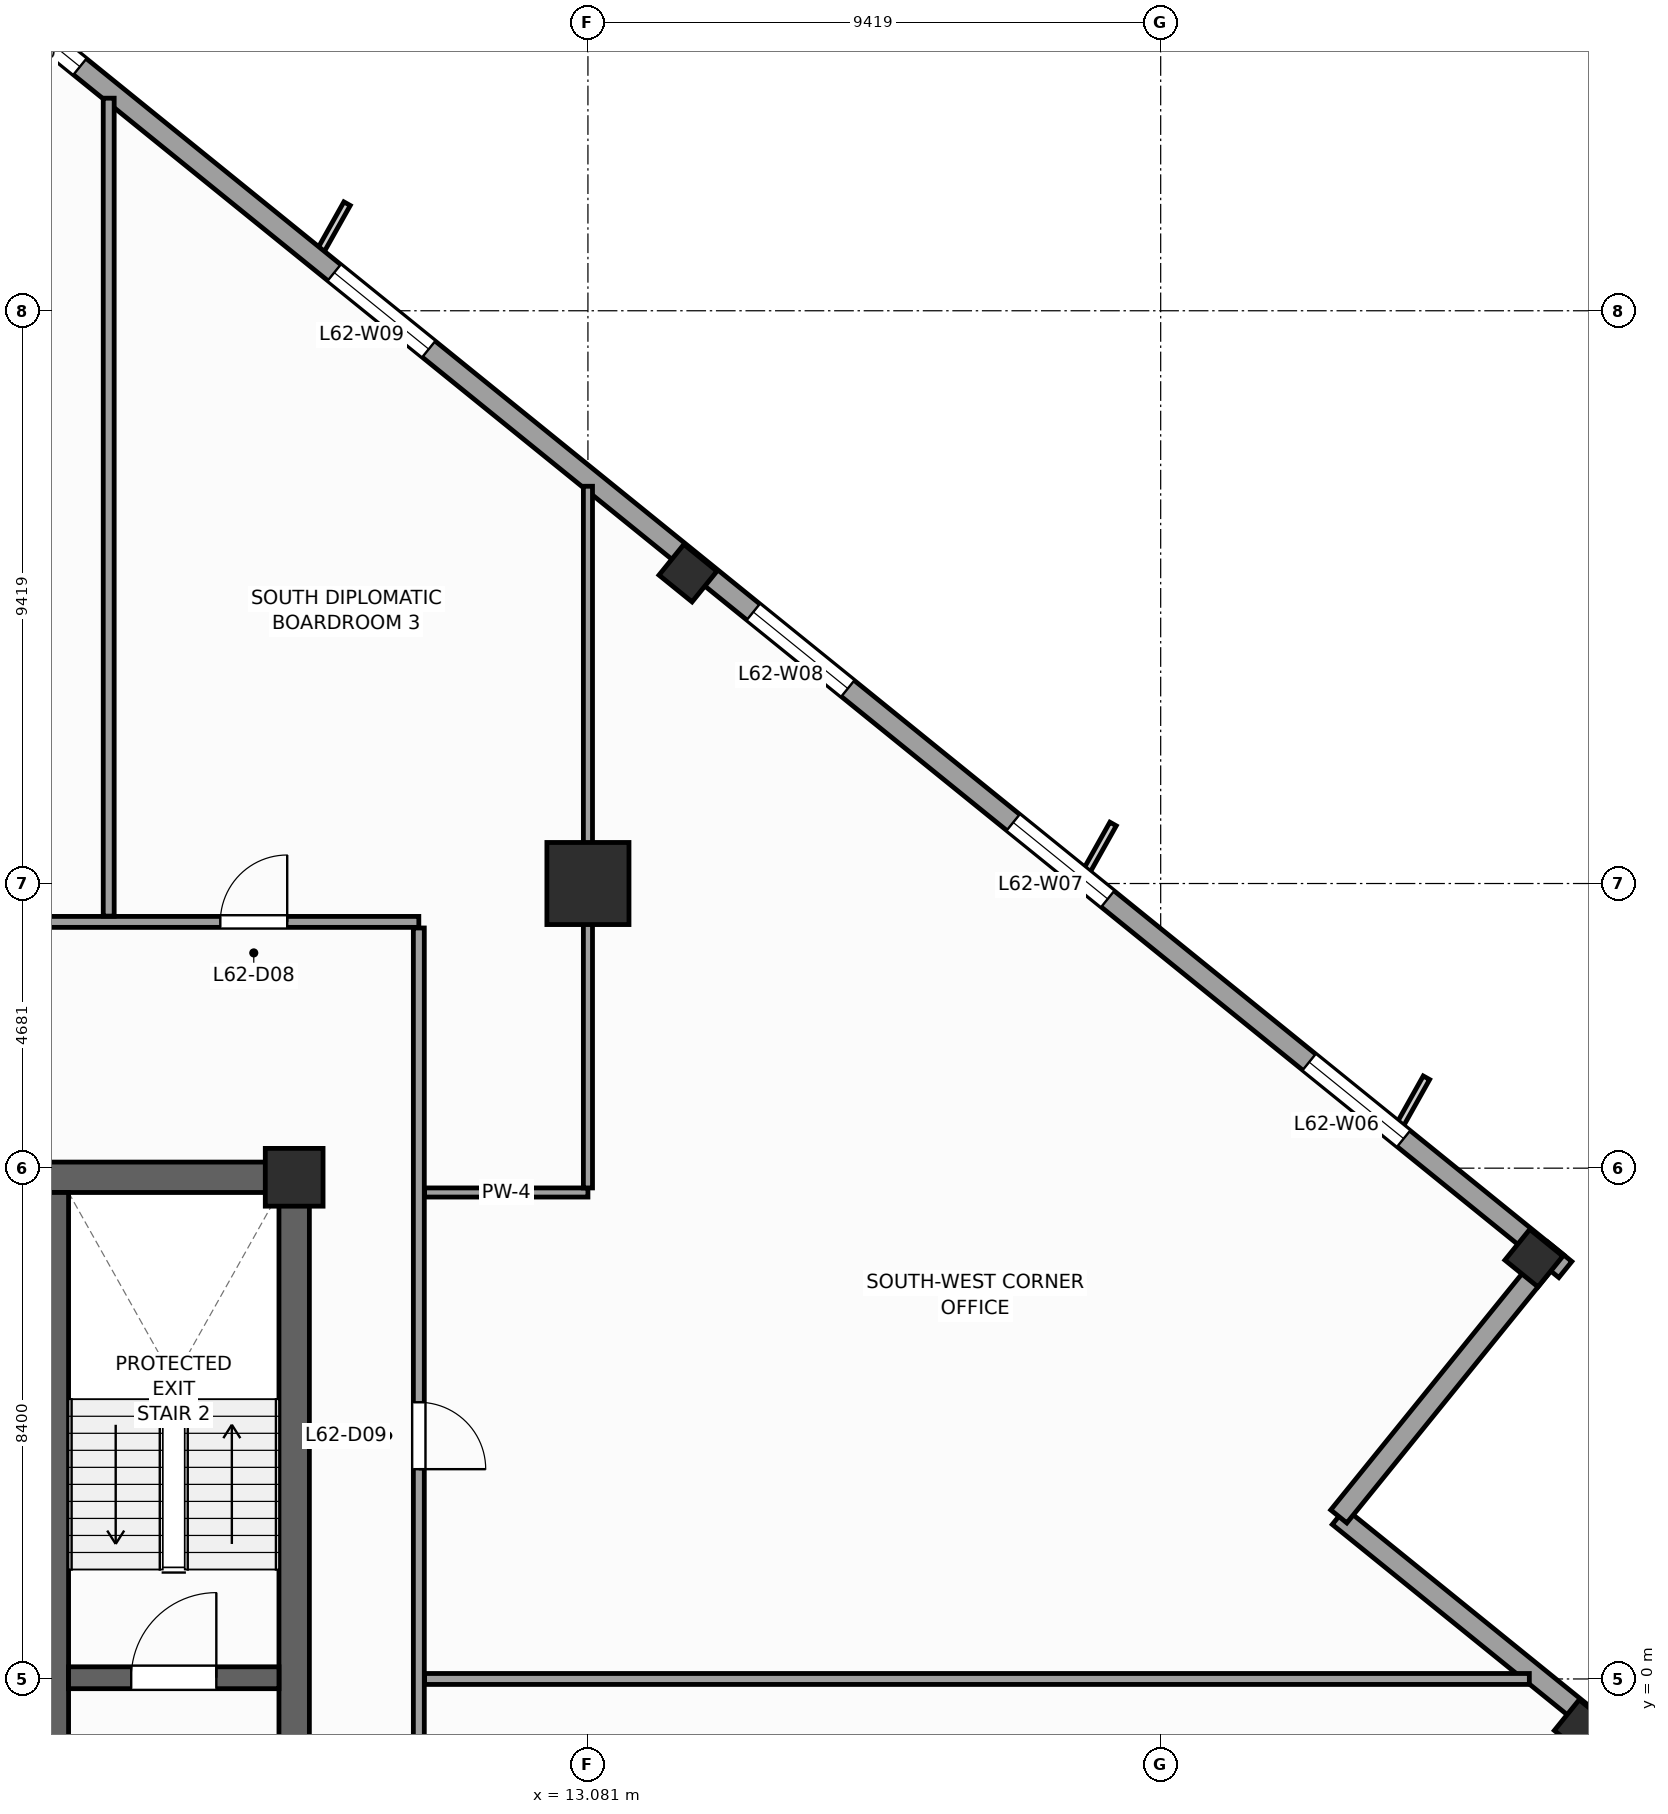
"""IFC4 building model, lengths in metres.
Left out: names, types, materials, properties, quantities, classifications, styles, units other than length and angle.
Written with IfcOpenShell. Run it as: python <this file> out.ifc"""

import sys

from ifc_helpers import new_model, si_unit, direction, frame, frame_2d, origin, origin_2d, place, context, subcontext, project, spatial, rectangle, extrude, source, transform, mapped, element, fill, save


model = new_model("IFC4")
c1 = context("Model", 3, precision=1e-05, world=origin(), true_north=direction((0.0, 1.0)))
c2 = subcontext(c1, "Body", "Model", "MODEL_VIEW")
j1 = project(units=[si_unit("LENGTHUNIT", "METRE"), si_unit("PLANEANGLEUNIT", "RADIAN")], contexts=[c1])
p1 = place(None, origin())
s1 = spatial("IfcSite", under=j1, at=p1, CompositionType="ELEMENT")
p2 = place(p1, origin())
s2 = spatial("IfcBuilding", under=s1, at=p2, CompositionType="ELEMENT")
p3 = place(p2, frame((0.0, 0.0, 256.3)))
s3 = spatial("IfcBuildingStorey", under=s2, at=p3, CompositionType="ELEMENT", Elevation=256.3)
p4 = place(p3, frame((-8.5, 8.25, 0.0), z_axis=(0.0, 0.0, 1.0), x_axis=(1.0, 0.0, 0.0)))
e1 = element("IfcWall", 1, at=p4, inside=s3, PredefinedType="SHEAR", context=c2, shape_type="SweptSolid", body=[
    extrude(rectangle(XDim=17.0, YDim=0.5, at=frame_2d((8.5, 0.0))), origin(), (0.0, 0.0, 1.0), 3.9),
])
p5 = place(p3, frame((8.25, -8.0, 0.0), z_axis=(0.0, 0.0, 1.0), x_axis=(0.0, 1.0, 0.0)))
e2 = element("IfcWall", 2, at=p5, inside=s3, PredefinedType="SHEAR", context=c2, shape_type="SweptSolid", body=[
    extrude(rectangle(XDim=16.0, YDim=0.5, at=frame_2d((8.0, 0.0))), origin(), (0.0, 0.0, 1.0), 3.9),
])
p6 = place(p5, frame((4.69, 0.0, 0.0)))
e3 = element("IfcOpeningElement", 3, at=p6, cuts=e2, PredefinedType="OPENING", context=c2, shape_type="SweptSolid", body=[
    extrude(rectangle(XDim=1.3, YDim=2.2, at=frame_2d((0.65, 1.1))), frame((0.0, 0.26, 0.0), z_axis=(0.0, -1.0, 0.0), x_axis=(1.0, 0.0, 0.0)), (0.0, 0.0, 1.0), 0.52),
])
p7 = place(p3, frame((4.36, -8.0, 0.0), z_axis=(0.0, 0.0, 1.0), x_axis=(0.0, 1.0, 0.0)))
e4 = element("IfcWall", 4, at=p7, inside=s3, PredefinedType="SHEAR", context=c2, shape_type="SweptSolid", body=[
    extrude(rectangle(XDim=16.0, YDim=0.36, at=frame_2d((8.0, 0.0))), origin(), (0.0, 0.0, 1.0), 3.9),
])
p8 = place(p3, frame((4.54, 0.02, 0.0), z_axis=(0.0, 0.0, 1.0), x_axis=(1.0, 0.0, 0.0)))
e5 = element("IfcWall", 5, at=p8, inside=s3, PredefinedType="SHEAR", context=c2, shape_type="SweptSolid", body=[
    extrude(rectangle(XDim=3.46, YDim=0.36, at=frame_2d((1.73, 0.0))), origin(), (0.0, 0.0, 1.0), 3.9),
])
p9 = place(p8, frame((1.03, 0.0, 0.0)))
e6 = element("IfcOpeningElement", 6, at=p9, cuts=e5, PredefinedType="OPENING", context=c2, shape_type="SweptSolid", body=[
    extrude(rectangle(XDim=1.4, YDim=2.2, at=frame_2d((0.7, 1.1))), frame((0.0, 0.19, 0.0), z_axis=(0.0, -1.0, 0.0), x_axis=(1.0, 0.0, 0.0)), (0.0, 0.0, 1.0), 0.38),
])
m1 = source(origin(), c2, "Body", "SweptSolid", [
    extrude(rectangle(XDim=0.95, YDim=0.95, at=origin_2d()), origin(), (0.0, 0.0, 1.0), 3.9),
])
p10 = place(p3, frame((8.25, 8.25, 0.0), z_axis=(0.0, 0.0, 1.0), x_axis=(1.0, 0.0, 0.0)))
e7 = element("IfcColumn", 7, at=p10, inside=s3, PredefinedType="PILASTER", context=c2, shape_type="MappedRepresentation", body=[
    mapped(m1, transform((0.0, 0.0, 0.0), scale=1.0)),
])
m2 = source(origin(), c2, "Body", "SweptSolid", [
    extrude(rectangle(XDim=1.35, YDim=1.35, at=origin_2d()), origin(), (0.0, 0.0, 1.0), 3.9),
])
p11 = place(p3, frame((13.081, 13.081, 0.0), z_axis=(0.0, 0.0, 1.0), x_axis=(1.0, 0.0, 0.0)))
e8 = element("IfcColumn", 8, at=p11, inside=s3, PredefinedType="COLUMN", context=c2, shape_type="MappedRepresentation", body=[
    mapped(m2, transform((0.0, 0.0, 0.0), scale=1.0)),
])
m3 = source(origin(), c2, "Body", "SweptSolid", [
    extrude(rectangle(XDim=0.65, YDim=0.7, at=origin_2d()), origin(), (0.0, 0.0, 1.0), 3.9),
])
for number, where, z_axis, x_axis in (
    (9, (29.45, -0.815, 0.0), (0.0, 0.0, 1.0), (0.629, 0.777, 0.0)),
    (10, (28.637, 6.92, 0.0), (0.0, 0.0, 1.0), (0.629, 0.777, 0.0)),
    (11, (14.726, 18.185, 0.0), (0.0, 0.0, 1.0), (0.629, 0.777, 0.0)),
):
    element("IfcColumn", number, at=place(p3, frame(where, z_axis=z_axis, x_axis=x_axis)), inside=s3, PredefinedType="COLUMN", context=c2, shape_type="MappedRepresentation", body=[
        mapped(m3, transform((0.0, 0.0, 0.0), scale=1.0)),
    ])
p12 = place(p3, frame((6.733, -29.154, 0.0), z_axis=(0.0, 0.0, 1.0), x_axis=(0.629325378072, 0.77714192302, 0.0)))
e12 = element("IfcWall", 12, at=p12, inside=s3, PredefinedType="STANDARD", context=c2, shape_type="SweptSolid", body=[
    extrude(rectangle(XDim=36.84, YDim=0.34, at=frame_2d((18.42, 0.0))), origin(), (0.0, 0.0, 1.0), 2.02),
])
p13 = place(p12, frame((23.495, 0.0, 0.0)))
e13 = element("IfcOpeningElement", 13, at=p13, cuts=e12, PredefinedType="OPENING", context=c2, shape_type="SweptSolid", body=[
    extrude(rectangle(XDim=1.05, YDim=2.02, at=frame_2d((0.525, 1.01))), frame((0.0, 0.18, 0.0), z_axis=(0.0, -1.0, 0.0), x_axis=(1.0, 0.0, 0.0)), (0.0, 0.0, 1.0), 0.36),
])
p14 = place(p12, frame((3.421, 0.0, 0.49)))
e14 = element("IfcOpeningElement", 14, at=p14, cuts=e12, PredefinedType="OPENING", context=c2, shape_type="SweptSolid", body=[
    extrude(rectangle(XDim=2.0, YDim=1.45, at=frame_2d((1.0, 0.725))), frame((0.0, 0.18, 0.0), z_axis=(0.0, -1.0, 0.0), x_axis=(1.0, 0.0, 0.0)), (0.0, 0.0, 1.0), 0.36),
])
p15 = place(p12, frame((11.184, 0.0, 0.49)))
e15 = element("IfcOpeningElement", 15, at=p15, cuts=e12, PredefinedType="OPENING", context=c2, shape_type="SweptSolid", body=[
    extrude(rectangle(XDim=2.0, YDim=1.45, at=frame_2d((1.0, 0.725))), frame((0.0, 0.18, 0.0), z_axis=(0.0, -1.0, 0.0), x_axis=(1.0, 0.0, 0.0)), (0.0, 0.0, 1.0), 0.36),
])
p16 = place(p12, frame((15.183, 0.0, 0.49)))
e16 = element("IfcOpeningElement", 16, at=p16, cuts=e12, PredefinedType="OPENING", context=c2, shape_type="SweptSolid", body=[
    extrude(rectangle(XDim=2.0, YDim=1.45, at=frame_2d((1.0, 0.725))), frame((0.0, 0.18, 0.0), z_axis=(0.0, -1.0, 0.0), x_axis=(1.0, 0.0, 0.0)), (0.0, 0.0, 1.0), 0.36),
])
p17 = place(p12, frame((26.301, 0.0, 0.49)))
e17 = element("IfcOpeningElement", 17, at=p17, cuts=e12, PredefinedType="OPENING", context=c2, shape_type="SweptSolid", body=[
    extrude(rectangle(XDim=2.0, YDim=1.45, at=frame_2d((1.0, 0.725))), frame((0.0, 0.18, 0.0), z_axis=(0.0, -1.0, 0.0), x_axis=(1.0, 0.0, 0.0)), (0.0, 0.0, 1.0), 0.36),
])
p18 = place(p12, frame((30.682, 0.0, 0.49)))
e18 = element("IfcOpeningElement", 18, at=p18, cuts=e12, PredefinedType="OPENING", context=c2, shape_type="SweptSolid", body=[
    extrude(rectangle(XDim=2.0, YDim=1.45, at=frame_2d((1.0, 0.725))), frame((0.0, 0.18, 0.0), z_axis=(0.0, -1.0, 0.0), x_axis=(1.0, 0.0, 0.0)), (0.0, 0.0, 1.0), 0.36),
])
p19 = place(p3, frame((29.703, -0.789, 0.0), z_axis=(0.0, 0.0, 1.0), x_axis=(-0.77714355312, 0.629323365087, 0.0)))
e19 = element("IfcWall", 19, at=p19, inside=s3, PredefinedType="STANDARD", context=c2, shape_type="SweptSolid", body=[
    extrude(rectangle(XDim=5.5, YDim=0.34, at=frame_2d((2.75, 0.0))), origin(), (0.0, 0.0, 1.0), 3.5),
])
p20 = place(p3, frame((25.429, 2.673, 0.0), z_axis=(0.0, 0.0, 1.0), x_axis=(0.629299794138, 0.777162640055, 0.0)))
e20 = element("IfcWall", 20, at=p20, inside=s3, PredefinedType="STANDARD", context=c2, shape_type="SweptSolid", body=[
    extrude(rectangle(XDim=5.67, YDim=0.34, at=frame_2d((2.835, 0.0))), origin(), (0.0, 0.0, 1.0), 2.02),
])
p21 = place(p3, frame((29.154, 6.733, 0.0), z_axis=(0.0, 0.0, 1.0), x_axis=(-0.77714192302, 0.629325378072, 0.0)))
e21 = element("IfcWall", 21, at=p21, inside=s3, PredefinedType="STANDARD", context=c2, shape_type="SweptSolid", body=[
    extrude(rectangle(XDim=36.84, YDim=0.34, at=frame_2d((18.42, 0.0))), origin(), (0.0, 0.0, 1.0), 2.02),
])
p22 = place(p21, frame((3.421, 0.0, 0.49)))
e22 = element("IfcOpeningElement", 22, at=p22, cuts=e21, PredefinedType="OPENING", context=c2, shape_type="SweptSolid", body=[
    extrude(rectangle(XDim=2.0, YDim=1.45, at=frame_2d((1.0, 0.725))), frame((0.0, 0.18, 0.0), z_axis=(0.0, -1.0, 0.0), x_axis=(1.0, 0.0, 0.0)), (0.0, 0.0, 1.0), 0.36),
])
p23 = place(p21, frame((9.684, 0.0, 0.49)))
e23 = element("IfcOpeningElement", 23, at=p23, cuts=e21, PredefinedType="OPENING", context=c2, shape_type="SweptSolid", body=[
    extrude(rectangle(XDim=2.0, YDim=1.45, at=frame_2d((1.0, 0.725))), frame((0.0, 0.18, 0.0), z_axis=(0.0, -1.0, 0.0), x_axis=(1.0, 0.0, 0.0)), (0.0, 0.0, 1.0), 0.36),
])
p24 = place(p21, frame((15.183, 0.0, 0.49)))
e24 = element("IfcOpeningElement", 24, at=p24, cuts=e21, PredefinedType="OPENING", context=c2, shape_type="SweptSolid", body=[
    extrude(rectangle(XDim=2.0, YDim=1.45, at=frame_2d((1.0, 0.725))), frame((0.0, 0.18, 0.0), z_axis=(0.0, -1.0, 0.0), x_axis=(1.0, 0.0, 0.0)), (0.0, 0.0, 1.0), 0.36),
])
p25 = place(p21, frame((24.051, 0.0, 0.49)))
e25 = element("IfcOpeningElement", 25, at=p25, cuts=e21, PredefinedType="OPENING", context=c2, shape_type="SweptSolid", body=[
    extrude(rectangle(XDim=2.0, YDim=1.45, at=frame_2d((1.0, 0.725))), frame((0.0, 0.18, 0.0), z_axis=(0.0, -1.0, 0.0), x_axis=(1.0, 0.0, 0.0)), (0.0, 0.0, 1.0), 0.36),
])
p26 = place(p21, frame((31.432, 0.0, 0.49)))
e26 = element("IfcOpeningElement", 26, at=p26, cuts=e21, PredefinedType="OPENING", context=c2, shape_type="SweptSolid", body=[
    extrude(rectangle(XDim=2.0, YDim=1.45, at=frame_2d((1.0, 0.725))), frame((0.0, 0.18, 0.0), z_axis=(0.0, -1.0, 0.0), x_axis=(1.0, 0.0, 0.0)), (0.0, 0.0, 1.0), 0.36),
])
p27 = place(p3, frame((-11.35, 12.45, 0.0), z_axis=(0.0, 0.0, 1.0), x_axis=(1.0, 0.0, 0.0)))
e27 = element("IfcWall", 27, at=p27, inside=s3, PredefinedType="PARTITIONING", context=c2, shape_type="SweptSolid", body=[
    extrude(rectangle(XDim=21.65, YDim=0.18, at=frame_2d((10.825, 0.0))), origin(), (0.0, 0.0, 1.0), 2.46),
])
p28 = place(p27, frame((2.689, 0.0, 0.0)))
e28 = element("IfcOpeningElement", 28, at=p28, cuts=e27, PredefinedType="OPENING", context=c2, shape_type="SweptSolid", body=[
    extrude(rectangle(XDim=1.1, YDim=2.2, at=frame_2d((0.55, 1.1))), frame((0.0, 0.1, 0.0), z_axis=(0.0, -1.0, 0.0), x_axis=(1.0, 0.0, 0.0)), (0.0, 0.0, 1.0), 0.2),
])
p29 = place(p27, frame((8.2, 0.0, 0.0)))
e29 = element("IfcOpeningElement", 29, at=p29, cuts=e27, PredefinedType="OPENING", context=c2, shape_type="SweptSolid", body=[
    extrude(rectangle(XDim=1.1, YDim=2.2, at=frame_2d((0.55, 1.1))), frame((0.0, 0.1, 0.0), z_axis=(0.0, -1.0, 0.0), x_axis=(1.0, 0.0, 0.0)), (0.0, 0.0, 1.0), 0.2),
])
p30 = place(p27, frame((13.4, 0.0, 0.0)))
e30 = element("IfcOpeningElement", 30, at=p30, cuts=e27, PredefinedType="OPENING", context=c2, shape_type="SweptSolid", body=[
    extrude(rectangle(XDim=1.1, YDim=2.2, at=frame_2d((0.55, 1.1))), frame((0.0, 0.1, 0.0), z_axis=(0.0, -1.0, 0.0), x_axis=(1.0, 0.0, 0.0)), (0.0, 0.0, 1.0), 0.2),
])
p31 = place(p27, frame((18.385, 0.0, 0.0)))
e31 = element("IfcOpeningElement", 31, at=p31, cuts=e27, PredefinedType="OPENING", context=c2, shape_type="SweptSolid", body=[
    extrude(rectangle(XDim=1.1, YDim=2.2, at=frame_2d((0.55, 1.1))), frame((0.0, 0.1, 0.0), z_axis=(0.0, -1.0, 0.0), x_axis=(1.0, 0.0, 0.0)), (0.0, 0.0, 1.0), 0.2),
])
p32 = place(p3, frame((10.3, -11.3, 0.0), z_axis=(0.0, 0.0, 1.0), x_axis=(0.0, 1.0, 0.0)))
e32 = element("IfcWall", 32, at=p32, inside=s3, PredefinedType="PARTITIONING", context=c2, shape_type="SweptSolid", body=[
    extrude(rectangle(XDim=23.65, YDim=0.18, at=frame_2d((11.825, 0.0))), origin(), (0.0, 0.0, 1.0), 3.5),
])
p33 = place(p32, frame((14.75, 0.0, 0.0)))
e33 = element("IfcOpeningElement", 33, at=p33, cuts=e32, PredefinedType="OPENING", context=c2, shape_type="SweptSolid", body=[
    extrude(rectangle(XDim=1.1, YDim=2.2, at=frame_2d((0.55, 1.1))), frame((0.0, 0.1, 0.0), z_axis=(0.0, -1.0, 0.0), x_axis=(1.0, 0.0, 0.0)), (0.0, 0.0, 1.0), 0.2),
])
p34 = place(p32, frame((6.75, 0.0, 0.0)))
e34 = element("IfcOpeningElement", 34, at=p34, cuts=e32, PredefinedType="OPENING", context=c2, shape_type="SweptSolid", body=[
    extrude(rectangle(XDim=1.1, YDim=2.2, at=frame_2d((0.55, 1.1))), frame((0.0, 0.1, 0.0), z_axis=(0.0, -1.0, 0.0), x_axis=(1.0, 0.0, 0.0)), (0.0, 0.0, 1.0), 0.2),
])
p35 = place(p3, frame((5.2, 12.545, 0.0), z_axis=(0.0, 0.0, 1.0), x_axis=(0.0, 1.0, 0.0)))
e35 = element("IfcWall", 35, at=p35, inside=s3, PredefinedType="PARTITIONING", context=c2, shape_type="SweptSolid", body=[
    extrude(rectangle(XDim=13.451, YDim=0.18, at=frame_2d((6.726, 0.0))), origin(), (0.0, 0.0, 1.0), 3.5),
])
p36 = place(p3, frame((10.395, 0.0, 0.0), z_axis=(0.0, 0.0, 1.0), x_axis=(1.0, 0.0, 0.0)))
e36 = element("IfcWall", 36, at=p36, inside=s3, PredefinedType="PARTITIONING", context=c2, shape_type="SweptSolid", body=[
    extrude(rectangle(XDim=18.167, YDim=0.18, at=frame_2d((9.084, 0.0))), origin(), (0.0, 0.0, 1.0), 3.5),
])
p37 = place(p3, frame((10.395, 8.0, 0.0), z_axis=(0.0, 0.0, 1.0), x_axis=(1.0, 0.0, 0.0)))
e37 = element("IfcWall", 37, at=p37, inside=s3, PredefinedType="PARTITIONING", context=c2, shape_type="SweptSolid", body=[
    extrude(rectangle(XDim=2.686, YDim=0.15, at=frame_2d((1.343, 0.0))), origin(), (0.0, 0.0, 1.0), 3.5),
])
p38 = place(p3, frame((13.081, 8.075, 0.0), z_axis=(0.0, 0.0, 1.0), x_axis=(0.0, 1.0, 0.0)))
e38 = element("IfcWall", 38, at=p38, inside=s3, PredefinedType="PARTITIONING", context=c2, shape_type="SweptSolid", body=[
    extrude(rectangle(XDim=11.539, YDim=0.15, at=frame_2d((5.77, 0.0))), origin(), (0.0, 0.0, 1.0), 2.05),
])
m4 = source(origin(), c2, "Body", "SweptSolid", [
    extrude(rectangle(XDim=2.0, YDim=1.45, at=frame_2d((1.0, 0.725))), frame((0.0, 0.03, 0.0), z_axis=(0.0, -1.0, 0.0), x_axis=(1.0, 0.0, 0.0)), (0.0, 0.0, 1.0), 0.06),
])
p39 = place(p22, origin())
e39 = element("IfcWindow", 39, at=p39, inside=s3, PartitioningType="SINGLE_PANEL", PredefinedType="WINDOW", context=c2, shape_type="MappedRepresentation", body=[
    mapped(m4, transform((0.0, 0.0, 0.0), scale=1.0)),
])
fill(e22, e39)
p40 = place(p23, origin())
e40 = element("IfcWindow", 40, at=p40, inside=s3, PartitioningType="SINGLE_PANEL", PredefinedType="WINDOW", context=c2, shape_type="MappedRepresentation", body=[
    mapped(m4, transform((0.0, 0.0, 0.0), scale=1.0)),
])
fill(e23, e40)
p41 = place(p24, origin())
e41 = element("IfcWindow", 41, at=p41, inside=s3, PartitioningType="SINGLE_PANEL", PredefinedType="WINDOW", context=c2, shape_type="MappedRepresentation", body=[
    mapped(m4, transform((0.0, 0.0, 0.0), scale=1.0)),
])
fill(e24, e41)
p42 = place(p25, origin())
e42 = element("IfcWindow", 42, at=p42, inside=s3, PartitioningType="SINGLE_PANEL", PredefinedType="WINDOW", context=c2, shape_type="MappedRepresentation", body=[
    mapped(m4, transform((0.0, 0.0, 0.0), scale=1.0)),
])
fill(e25, e42)
p43 = place(p26, origin())
e43 = element("IfcWindow", 43, at=p43, inside=s3, PartitioningType="SINGLE_PANEL", PredefinedType="WINDOW", context=c2, shape_type="MappedRepresentation", body=[
    mapped(m4, transform((0.0, 0.0, 0.0), scale=1.0)),
])
fill(e26, e43)
m5 = source(origin(), c2, "Body", "SweptSolid", [
    extrude(rectangle(XDim=1.4, YDim=2.2, at=frame_2d((0.7, 1.1))), frame((0.0, 0.025, 0.0), z_axis=(0.0, -1.0, 0.0), x_axis=(1.0, 0.0, 0.0)), (0.0, 0.0, 1.0), 0.05),
])
p44 = place(p9, origin())
e44 = element("IfcDoor", 44, at=p44, inside=s3, OperationType="SINGLE_SWING_RIGHT", PredefinedType="DOOR", context=c2, shape_type="MappedRepresentation", body=[
    mapped(m5, transform((0.0, 0.0, 0.0), scale=1.0)),
])
fill(e6, e44)
m6 = source(origin(), c2, "Body", "SweptSolid", [
    extrude(rectangle(XDim=1.1, YDim=2.2, at=frame_2d((0.55, 1.1))), frame((0.0, 0.025, 0.0), z_axis=(0.0, -1.0, 0.0), x_axis=(1.0, 0.0, 0.0)), (0.0, 0.0, 1.0), 0.05),
])
p45 = place(p31, origin())
e45 = element("IfcDoor", 45, at=p45, inside=s3, OperationType="SINGLE_SWING_RIGHT", PredefinedType="DOOR", context=c2, shape_type="MappedRepresentation", body=[
    mapped(m6, transform((0.0, 0.0, 0.0), scale=1.0)),
])
fill(e31, e45)
p46 = place(p33, frame((1.1, 0.0, 0.0), z_axis=(0.0, 0.0, 1.0), x_axis=(-1.0, 0.0, 0.0)))
e46 = element("IfcDoor", 46, at=p46, inside=s3, OperationType="SINGLE_SWING_LEFT", PredefinedType="DOOR", context=c2, shape_type="MappedRepresentation", body=[
    mapped(m6, transform((0.0, 0.0, 0.0), scale=1.0)),
])
fill(e33, e46)
save(model, sys.argv[1])
